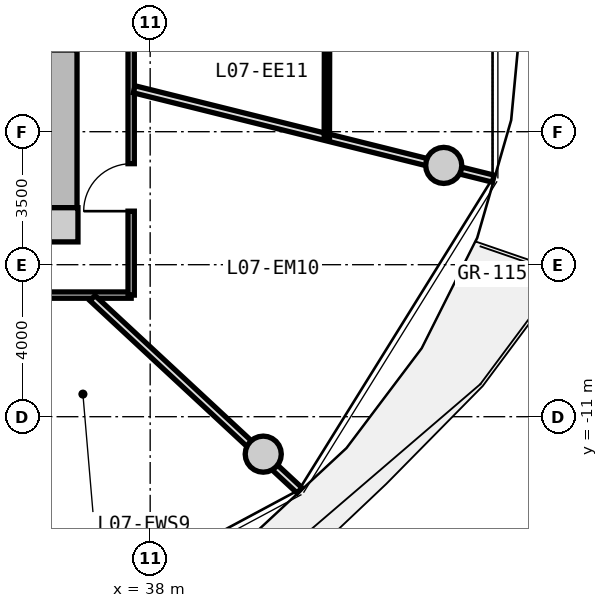
"""IFC4 building model, lengths in metres.
Left out: names, types, materials, properties, quantities, classifications, styles, units other than length and angle.
Written with IfcOpenShell. Run it as: python <this file> out.ifc"""

import sys

from ifc_helpers import new_model, si_unit, direction, frame, frame_2d, origin, origin_2d, place, context, subcontext, project, spatial, rectangle, circle, extrude, source, transform, mapped, element, fill, save


model = new_model("IFC4")
c1 = context("Model", 3, precision=1e-05, world=origin(), true_north=direction((0.0, 1.0)))
c2 = subcontext(c1, "Body", "Model", "MODEL_VIEW")
j1 = project(units=[si_unit("LENGTHUNIT", "METRE"), si_unit("PLANEANGLEUNIT", "RADIAN")], contexts=[c1])
p1 = place(None, origin())
s1 = spatial("IfcSite", under=j1, at=p1, CompositionType="ELEMENT")
p2 = place(p1, origin())
s2 = spatial("IfcBuilding", under=s1, at=p2, CompositionType="ELEMENT")
p3 = place(p2, frame((0.0, 0.0, 27.7)))
s3 = spatial("IfcBuildingStorey", under=s2, at=p3, CompositionType="ELEMENT", Elevation=27.7)
m1 = source(origin(), c2, "Body", "SweptSolid", [
    extrude(rectangle(XDim=0.9, YDim=0.9, at=origin_2d()), origin(), (0.0, 0.0, 1.0), 3.05),
])
p4 = place(p3, frame((35.65, -5.95, 0.0), z_axis=(0.0, 0.0, 1.0), x_axis=(1.0, 0.0, 0.0)))
e1 = element("IfcColumn", 1, at=p4, inside=s3, PredefinedType="COLUMN", context=c2, shape_type="MappedRepresentation", body=[
    mapped(m1, transform((0.0, 0.0, 0.0), x_axis=(1.0, 0.0, 0.0), y_axis=(0.0, 1.0, 0.0), z_axis=(0.0, 0.0, 1.0), scale=1.0)),
])
m2 = source(origin(), c2, "Body", "SweptSolid", [
    extrude(rectangle(XDim=11.0, YDim=0.85, at=frame_2d((5.5, 0.0))), origin(), (0.0, 0.0, 1.0), 2.79),
])
p5 = place(p3, frame((35.65, 5.5, 0.0), z_axis=(0.0, 0.0, 1.0), x_axis=(0.0, -1.0, 0.0)))
e2 = element("IfcWall", 2, at=p5, inside=s3, PredefinedType="SHEAR", context=c2, shape_type="MappedRepresentation", body=[
    mapped(m2, transform((0.0, 0.0, 0.0), x_axis=(1.0, 0.0, 0.0), y_axis=(0.0, 1.0, 0.0), z_axis=(0.0, 0.0, 1.0), scale=1.0)),
])
p6 = place(p5, frame((5.65, 0.0, 0.0)))
e3 = element("IfcOpeningElement", 3, at=p6, cuts=e2, PredefinedType="OPENING", context=c2, shape_type="SweptSolid", body=[
    extrude(rectangle(XDim=1.2, YDim=2.15, at=frame_2d((0.6, 1.075))), frame((0.0, 0.435, 0.0), z_axis=(0.0, -1.0, 0.0), x_axis=(1.0, 0.0, 0.0)), (0.0, 0.0, 1.0), 0.87),
])
m3 = source(origin(), c2, "Body", "SweptSolid", [
    extrude(circle(Radius=0.475, at=origin_2d()), origin(), (0.0, 0.0, 1.0), 3.05),
])
for number, where, z_axis, x_axis in (
    (4, (40.975, -11.985, 0.0), (0.0, 0.0, 1.0), (1.0, 0.0, 0.0)),
    (5, (45.725, -4.387, 0.0), (0.0, 0.0, 1.0), (1.0, 0.0, 0.0)),
):
    element("IfcColumn", number, at=place(p3, frame(where, z_axis=z_axis, x_axis=x_axis)), inside=s3, PredefinedType="COLUMN", context=c2, shape_type="MappedRepresentation", body=[
        mapped(m3, transform((0.0, 0.0, 0.0), x_axis=(1.0, 0.0, 0.0), y_axis=(0.0, 1.0, 0.0), z_axis=(0.0, 0.0, 1.0), scale=1.0)),
    ])
m4 = source(origin(), c2, "Body", "SweptSolid", [
    extrude(rectangle(XDim=19.0, YDim=0.165, at=frame_2d((9.5, 0.0))), origin(), (0.0, 0.0, 1.0), 2.775),
])
p7 = place(p3, frame((37.5, -7.8, 0.0), z_axis=(0.0, 0.0, 1.0), x_axis=(-1.0, 0.0, 0.0)))
e6 = element("IfcWall", 6, at=p7, inside=s3, PredefinedType="PARTITIONING", context=c2, shape_type="MappedRepresentation", body=[
    mapped(m4, transform((0.0, 0.0, 0.0), x_axis=(1.0, 0.0, 0.0), y_axis=(0.0, 1.0, 0.0), z_axis=(0.0, 0.0, 1.0), scale=1.0)),
])
p8 = place(p7, frame((8.875, 0.0, 0.0)))
e7 = element("IfcOpeningElement", 7, at=p8, cuts=e6, PredefinedType="OPENING", context=c2, shape_type="SweptSolid", body=[
    extrude(rectangle(XDim=1.25, YDim=2.2, at=frame_2d((0.625, 1.1))), frame((0.0, 0.093, 0.0), z_axis=(0.0, -1.0, 0.0), x_axis=(1.0, 0.0, 0.0)), (0.0, 0.0, 1.0), 0.185),
])
p9 = place(p7, frame((5.915, 0.0, 0.0)))
e8 = element("IfcOpeningElement", 8, at=p9, cuts=e6, PredefinedType="OPENING", context=c2, shape_type="SweptSolid", body=[
    extrude(rectangle(XDim=0.92, YDim=2.1, at=frame_2d((0.46, 1.05))), frame((0.0, 0.093, 0.0), z_axis=(0.0, -1.0, 0.0), x_axis=(1.0, 0.0, 0.0)), (0.0, 0.0, 1.0), 0.185),
])
p10 = place(p7, frame((2.769, 0.0, 0.0)))
e9 = element("IfcOpeningElement", 9, at=p10, cuts=e6, PredefinedType="OPENING", context=c2, shape_type="SweptSolid", body=[
    extrude(rectangle(XDim=0.92, YDim=2.1, at=frame_2d((0.46, 1.05))), frame((0.0, 0.093, 0.0), z_axis=(0.0, -1.0, 0.0), x_axis=(1.0, 0.0, 0.0)), (0.0, 0.0, 1.0), 0.185),
])
m5 = source(origin(), c2, "Body", "SweptSolid", [
    extrude(rectangle(XDim=15.6, YDim=0.165, at=frame_2d((7.8, 0.0))), origin(), (0.0, 0.0, 1.0), 2.775),
])
p11 = place(p3, frame((37.5, 7.8, 0.0), z_axis=(0.0, 0.0, 1.0), x_axis=(0.0, -1.0, 0.0)))
e10 = element("IfcWall", 10, at=p11, inside=s3, PredefinedType="PARTITIONING", context=c2, shape_type="MappedRepresentation", body=[
    mapped(m5, transform((0.0, 0.0, 0.0), x_axis=(1.0, 0.0, 0.0), y_axis=(0.0, 1.0, 0.0), z_axis=(0.0, 0.0, 1.0), scale=1.0)),
])
p12 = place(p11, frame((12.141, 0.0, 0.0)))
e11 = element("IfcOpeningElement", 11, at=p12, cuts=e10, PredefinedType="OPENING", context=c2, shape_type="SweptSolid", body=[
    extrude(rectangle(XDim=1.25, YDim=2.2, at=frame_2d((0.625, 1.1))), frame((0.0, 0.093, 0.0), z_axis=(0.0, -1.0, 0.0), x_axis=(1.0, 0.0, 0.0)), (0.0, 0.0, 1.0), 0.185),
])
p13 = place(p11, frame((6.196, 0.0, 0.0)))
e12 = element("IfcOpeningElement", 12, at=p13, cuts=e10, PredefinedType="OPENING", context=c2, shape_type="SweptSolid", body=[
    extrude(rectangle(XDim=1.05, YDim=2.15, at=frame_2d((0.525, 1.075))), frame((0.0, 0.093, 0.0), z_axis=(0.0, -1.0, 0.0), x_axis=(1.0, 0.0, 0.0)), (0.0, 0.0, 1.0), 0.185),
])
p14 = place(p11, frame((1.092, 0.0, 0.0)))
e13 = element("IfcOpeningElement", 13, at=p14, cuts=e10, PredefinedType="OPENING", context=c2, shape_type="SweptSolid", body=[
    extrude(rectangle(XDim=1.05, YDim=2.15, at=frame_2d((0.525, 1.075))), frame((0.0, 0.093, 0.0), z_axis=(0.0, -1.0, 0.0), x_axis=(1.0, 0.0, 0.0)), (0.0, 0.0, 1.0), 0.185),
])
m6 = source(origin(), c2, "Body", "SweptSolid", [
    extrude(rectangle(XDim=7.435, YDim=0.19, at=frame_2d((3.717, 0.0))), origin(), (0.0, 0.0, 1.0), 2.225),
])
p15 = place(p3, frame((36.483, -7.88, 0.0), z_axis=(0.0, 0.0, 1.0), x_axis=(0.732651956848, -0.680603489652, 0.0)))
e14 = element("IfcWall", 14, at=p15, inside=s3, PredefinedType="PARTITIONING", context=c2, shape_type="MappedRepresentation", body=[
    mapped(m6, transform((0.0, 0.0, 0.0), x_axis=(1.0, 0.0, 0.0), y_axis=(0.0, 1.0, 0.0), z_axis=(0.0, 0.0, 1.0), scale=1.0)),
])
m7 = source(origin(), c2, "Body", "SweptSolid", [
    extrude(rectangle(XDim=9.225, YDim=0.14, at=frame_2d((4.613, 0.0))), origin(), (0.0, 0.0, 1.0), 2.775),
])
p16 = place(p3, frame((31.946, -7.83, 0.0), z_axis=(0.0, 0.0, 1.0), x_axis=(0.450460543767, -0.892796336523, 0.0)))
e15 = element("IfcWall", 15, at=p16, inside=s3, PredefinedType="PARTITIONING", context=c2, shape_type="MappedRepresentation", body=[
    mapped(m7, transform((0.0, 0.0, 0.0), x_axis=(1.0, 0.0, 0.0), y_axis=(0.0, 1.0, 0.0), z_axis=(0.0, 0.0, 1.0), scale=1.0)),
])
m8 = source(origin(), c2, "Body", "SweptSolid", [
    extrude(rectangle(XDim=9.737, YDim=0.19, at=frame_2d((4.869, 0.0))), origin(), (0.0, 0.0, 1.0), 2.225),
])
p17 = place(p3, frame((37.58, -2.385, 0.0), z_axis=(0.0, 0.0, 1.0), x_axis=(0.970392716238, -0.241532557375, 0.0)))
e16 = element("IfcWall", 16, at=p17, inside=s3, PredefinedType="PARTITIONING", context=c2, shape_type="MappedRepresentation", body=[
    mapped(m8, transform((0.0, 0.0, 0.0), x_axis=(1.0, 0.0, 0.0), y_axis=(0.0, 1.0, 0.0), z_axis=(0.0, 0.0, 1.0), scale=1.0)),
])
m9 = source(origin(), c2, "Body", "SweptSolid", [
    extrude(rectangle(XDim=3.187, YDim=0.14, at=frame_2d((1.594, 0.0))), origin(), (0.0, 0.0, 1.0), 2.775),
])
p18 = place(p3, frame((42.655, -0.478, 0.0), z_axis=(0.0, 0.0, 1.0), x_axis=(-0.002221365642, -0.999997532764, 0.0)))
e17 = element("IfcWall", 17, at=p18, inside=s3, PredefinedType="PARTITIONING", context=c2, shape_type="MappedRepresentation", body=[
    mapped(m9, transform((0.0, 0.0, 0.0), x_axis=(1.0, 0.0, 0.0), y_axis=(0.0, 1.0, 0.0), z_axis=(0.0, 0.0, 1.0), scale=1.0)),
])
m10 = source(origin(), c2, "Body", "SweptSolid", [
    extrude(rectangle(XDim=1.25, YDim=2.2, at=frame_2d((0.625, 1.1))), frame((0.0, 0.025, 0.0), z_axis=(0.0, -1.0, 0.0), x_axis=(1.0, 0.0, 0.0)), (0.0, 0.0, 1.0), 0.05),
])
p19 = place(p12, frame((1.25, 0.0, 0.0), z_axis=(0.0, 0.0, 1.0), x_axis=(-1.0, 0.0, 0.0)))
e18 = element("IfcDoor", 18, at=p19, inside=s3, OperationType="SINGLE_SWING_LEFT", PredefinedType="DOOR", context=c2, shape_type="MappedRepresentation", body=[
    mapped(m10, transform((0.0, 0.0, 0.0), x_axis=(1.0, 0.0, 0.0), y_axis=(0.0, 1.0, 0.0), z_axis=(0.0, 0.0, 1.0), scale=1.0)),
])
fill(e11, e18)
save(model, sys.argv[1])
